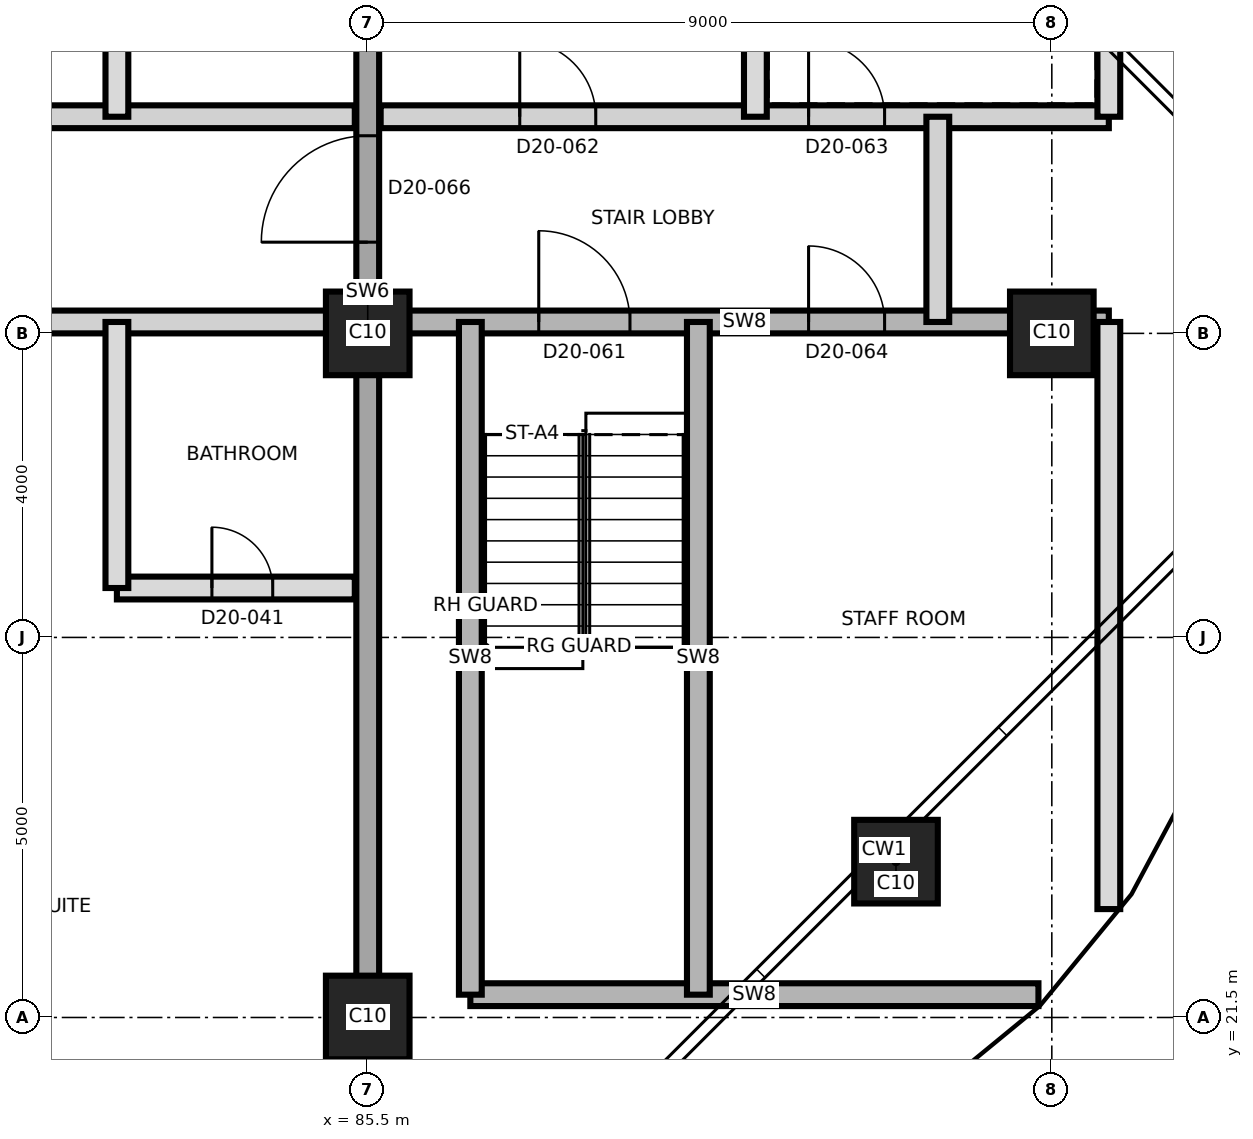
"""IFC4 building model, lengths in metres.
Left out: names, types, materials, properties, quantities, classifications, styles, units other than length and angle.
Written with IfcOpenShell. Run it as: python <this file> out.ifc"""

import sys

from ifc_helpers import new_model, si_unit, direction, frame, frame_2d, origin, origin_2d, place, context, subcontext, project, spatial, rectangle, extrude, element, fill, save


model = new_model("IFC4")
c1 = context("Model", 3, precision=1e-05, world=origin(), true_north=direction((0.0, 1.0)))
c2 = subcontext(c1, "Body", "Model", "MODEL_VIEW")
j1 = project(units=[si_unit("LENGTHUNIT", "METRE"), si_unit("PLANEANGLEUNIT", "RADIAN")], contexts=[c1])
p1 = place(None, origin())
s1 = spatial("IfcSite", under=j1, at=p1, CompositionType="ELEMENT")
p2 = place(p1, origin())
s2 = spatial("IfcBuilding", under=s1, at=p2, CompositionType="ELEMENT")
p3 = place(p2, frame((0.0, 0.0, 182.9)))
s3 = spatial("IfcBuildingStorey", under=s2, at=p3, CompositionType="ELEMENT", Elevation=182.9)
for number, where, z_axis, x_axis in (
    (1, (85.5, 21.5, 0.0), (0.0, 0.0, 1.0), (1.0, 0.0, 0.0)),
    (2, (92.45, 23.55, 0.0), (0.0, 0.0, 1.0), (1.0, 0.0, 0.0)),
    (3, (85.5, 30.5, 0.0), (0.0, 0.0, 1.0), (1.0, 0.0, 0.0)),
    (4, (94.5, 30.5, 0.0), (0.0, 0.0, 1.0), (1.0, 0.0, 0.0)),
):
    element("IfcColumn", number, at=place(p3, frame(where, z_axis=z_axis, x_axis=x_axis)), inside=s3, PredefinedType="COLUMN", context=c2, shape_type="SweptSolid", body=[
        extrude(rectangle(XDim=1.1, YDim=1.1, at=origin_2d()), origin(), (0.0, 0.0, 1.0), 3.7),
    ])
p4 = place(p3, frame((85.5, 19.17, 0.0), z_axis=(0.0, 0.0, 1.0), x_axis=(0.0, 1.0, 0.0)))
e5 = element("IfcWall", 5, at=p4, inside=s3, PredefinedType="SHEAR", context=c2, shape_type="SweptSolid", body=[
    extrude(rectangle(XDim=22.66, YDim=0.3, at=frame_2d((11.33, 0.0))), origin(), (0.0, 0.0, 1.0), 3.7),
])
p5 = place(p4, frame((12.53, 0.0, 0.0)))
e6 = element("IfcOpeningElement", 6, at=p5, cuts=e5, PredefinedType="OPENING", context=c2, shape_type="SweptSolid", body=[
    extrude(rectangle(XDim=1.4, YDim=2.1, at=frame_2d((0.7, 1.05))), frame((0.0, 0.16, 0.0), z_axis=(0.0, -1.0, 0.0), x_axis=(1.0, 0.0, 0.0)), (0.0, 0.0, 1.0), 0.32),
])
p6 = place(p3, frame((86.85, 21.8, 0.0), z_axis=(0.0, 0.0, 1.0), x_axis=(1.0, 0.0, 0.0)))
e7 = element("IfcWall", 7, at=p6, inside=s3, PredefinedType="SHEAR", context=c2, shape_type="SweptSolid", body=[
    extrude(rectangle(XDim=7.474, YDim=0.3, at=frame_2d((3.737, 0.0))), origin(), (0.0, 0.0, 1.0), 3.4),
])
p7 = place(p3, frame((82.2, 27.15, 0.0), z_axis=(0.0, 0.0, 1.0), x_axis=(1.0, 0.0, 0.0)))
e8 = element("IfcWall", 8, at=p7, inside=s3, PredefinedType="PARTITIONING", context=c2, shape_type="SweptSolid", body=[
    extrude(rectangle(XDim=3.13, YDim=0.3, at=frame_2d((1.565, 0.0))), origin(), (0.0, 0.0, 1.0), 3.4),
])
p8 = place(p7, frame((1.25, 0.0, 0.0)))
e9 = element("IfcOpeningElement", 9, at=p8, cuts=e8, PredefinedType="OPENING", context=c2, shape_type="SweptSolid", body=[
    extrude(rectangle(XDim=0.8, YDim=2.1, at=frame_2d((0.4, 1.05))), frame((0.0, 0.16, 0.0), z_axis=(0.0, -1.0, 0.0), x_axis=(1.0, 0.0, 0.0)), (0.0, 0.0, 1.0), 0.32),
])
p9 = place(p3, frame((58.65, 30.65, 0.0), z_axis=(0.0, 0.0, 1.0), x_axis=(1.0, 0.0, 0.0)))
e10 = element("IfcWall", 10, at=p9, inside=s3, PredefinedType="PARTITIONING", context=c2, shape_type="SweptSolid", body=[
    extrude(rectangle(XDim=26.68, YDim=0.3, at=frame_2d((13.34, 0.0))), origin(), (0.0, 0.0, 1.0), 3.4),
])
p10 = place(p9, frame((2.9, 0.0, 0.0)))
e11 = element("IfcOpeningElement", 11, at=p10, cuts=e10, PredefinedType="OPENING", context=c2, shape_type="SweptSolid", body=[
    extrude(rectangle(XDim=1.0, YDim=2.1, at=frame_2d((0.5, 1.05))), frame((0.0, 0.16, 0.0), z_axis=(0.0, -1.0, 0.0), x_axis=(1.0, 0.0, 0.0)), (0.0, 0.0, 1.0), 0.32),
])
p11 = place(p9, frame((5.85, 0.0, 0.0)))
e12 = element("IfcOpeningElement", 12, at=p11, cuts=e10, PredefinedType="OPENING", context=c2, shape_type="SweptSolid", body=[
    extrude(rectangle(XDim=1.4, YDim=2.1, at=frame_2d((0.7, 1.05))), frame((0.0, 0.16, 0.0), z_axis=(0.0, -1.0, 0.0), x_axis=(1.0, 0.0, 0.0)), (0.0, 0.0, 1.0), 0.32),
])
p12 = place(p9, frame((10.0, 0.0, 0.0)))
e13 = element("IfcOpeningElement", 13, at=p12, cuts=e10, PredefinedType="OPENING", context=c2, shape_type="SweptSolid", body=[
    extrude(rectangle(XDim=1.0, YDim=2.1, at=frame_2d((0.5, 1.05))), frame((0.0, 0.16, 0.0), z_axis=(0.0, -1.0, 0.0), x_axis=(1.0, 0.0, 0.0)), (0.0, 0.0, 1.0), 0.32),
])
p13 = place(p9, frame((15.85, 0.0, 0.0)))
e14 = element("IfcOpeningElement", 14, at=p13, cuts=e10, PredefinedType="OPENING", context=c2, shape_type="SweptSolid", body=[
    extrude(rectangle(XDim=1.0, YDim=2.1, at=frame_2d((0.5, 1.05))), frame((0.0, 0.16, 0.0), z_axis=(0.0, -1.0, 0.0), x_axis=(1.0, 0.0, 0.0)), (0.0, 0.0, 1.0), 0.32),
])
p14 = place(p9, frame((20.2, 0.0, 0.0)))
e15 = element("IfcOpeningElement", 15, at=p14, cuts=e10, PredefinedType="OPENING", context=c2, shape_type="SweptSolid", body=[
    extrude(rectangle(XDim=1.0, YDim=2.1, at=frame_2d((0.5, 1.05))), frame((0.0, 0.16, 0.0), z_axis=(0.0, -1.0, 0.0), x_axis=(1.0, 0.0, 0.0)), (0.0, 0.0, 1.0), 0.32),
])
p15 = place(p3, frame((85.67, 30.65, 0.0), z_axis=(0.0, 0.0, 1.0), x_axis=(1.0, 0.0, 0.0)))
e16 = element("IfcWall", 16, at=p15, inside=s3, PredefinedType="SHEAR", context=c2, shape_type="SweptSolid", body=[
    extrude(rectangle(XDim=9.58, YDim=0.3, at=frame_2d((4.79, 0.0))), origin(), (0.0, 0.0, 1.0), 3.4),
])
p16 = place(p15, frame((2.08, 0.0, 0.0)))
e17 = element("IfcOpeningElement", 17, at=p16, cuts=e16, PredefinedType="OPENING", context=c2, shape_type="SweptSolid", body=[
    extrude(rectangle(XDim=1.2, YDim=2.1, at=frame_2d((0.6, 1.05))), frame((0.0, 0.16, 0.0), z_axis=(0.0, -1.0, 0.0), x_axis=(1.0, 0.0, 0.0)), (0.0, 0.0, 1.0), 0.32),
])
p17 = place(p15, frame((5.63, 0.0, 0.0)))
e18 = element("IfcOpeningElement", 18, at=p17, cuts=e16, PredefinedType="OPENING", context=c2, shape_type="SweptSolid", body=[
    extrude(rectangle(XDim=1.0, YDim=2.1, at=frame_2d((0.5, 1.05))), frame((0.0, 0.16, 0.0), z_axis=(0.0, -1.0, 0.0), x_axis=(1.0, 0.0, 0.0)), (0.0, 0.0, 1.0), 0.32),
])
p18 = place(p3, frame((58.65, 33.35, 0.0), z_axis=(0.0, 0.0, 1.0), x_axis=(1.0, 0.0, 0.0)))
e19 = element("IfcWall", 19, at=p18, inside=s3, PredefinedType="PARTITIONING", context=c2, shape_type="SweptSolid", body=[
    extrude(rectangle(XDim=26.68, YDim=0.3, at=frame_2d((13.34, 0.0))), origin(), (0.0, 0.0, 1.0), 3.4),
])
p19 = place(p18, frame((3.265, 0.0, 0.0)))
e20 = element("IfcOpeningElement", 20, at=p19, cuts=e19, PredefinedType="OPENING", context=c2, shape_type="SweptSolid", body=[
    extrude(rectangle(XDim=1.0, YDim=2.1, at=frame_2d((0.5, 1.05))), frame((0.0, 0.16, 0.0), z_axis=(0.0, -1.0, 0.0), x_axis=(1.0, 0.0, 0.0)), (0.0, 0.0, 1.0), 0.32),
])
p20 = place(p18, frame((6.215, 0.0, 0.0)))
e21 = element("IfcOpeningElement", 21, at=p20, cuts=e19, PredefinedType="OPENING", context=c2, shape_type="SweptSolid", body=[
    extrude(rectangle(XDim=1.4, YDim=2.1, at=frame_2d((0.7, 1.05))), frame((0.0, 0.16, 0.0), z_axis=(0.0, -1.0, 0.0), x_axis=(1.0, 0.0, 0.0)), (0.0, 0.0, 1.0), 0.32),
])
p21 = place(p18, frame((9.985, 0.0, 0.0)))
e22 = element("IfcOpeningElement", 22, at=p21, cuts=e19, PredefinedType="OPENING", context=c2, shape_type="SweptSolid", body=[
    extrude(rectangle(XDim=1.2, YDim=2.1, at=frame_2d((0.6, 1.05))), frame((0.0, 0.16, 0.0), z_axis=(0.0, -1.0, 0.0), x_axis=(1.0, 0.0, 0.0)), (0.0, 0.0, 1.0), 0.32),
])
p22 = place(p18, frame((13.235, 0.0, 0.0)))
e23 = element("IfcOpeningElement", 23, at=p22, cuts=e19, PredefinedType="OPENING", context=c2, shape_type="SweptSolid", body=[
    extrude(rectangle(XDim=1.0, YDim=2.1, at=frame_2d((0.5, 1.05))), frame((0.0, 0.16, 0.0), z_axis=(0.0, -1.0, 0.0), x_axis=(1.0, 0.0, 0.0)), (0.0, 0.0, 1.0), 0.32),
])
p23 = place(p18, frame((20.2, 0.0, 0.0)))
e24 = element("IfcOpeningElement", 24, at=p23, cuts=e19, PredefinedType="OPENING", context=c2, shape_type="SweptSolid", body=[
    extrude(rectangle(XDim=1.0, YDim=2.1, at=frame_2d((0.5, 1.05))), frame((0.0, 0.16, 0.0), z_axis=(0.0, -1.0, 0.0), x_axis=(1.0, 0.0, 0.0)), (0.0, 0.0, 1.0), 0.32),
])
p24 = place(p3, frame((85.67, 33.35, 0.0), z_axis=(0.0, 0.0, 1.0), x_axis=(1.0, 0.0, 0.0)))
e25 = element("IfcWall", 25, at=p24, inside=s3, PredefinedType="PARTITIONING", context=c2, shape_type="SweptSolid", body=[
    extrude(rectangle(XDim=9.58, YDim=0.3, at=frame_2d((4.79, 0.0))), origin(), (0.0, 0.0, 1.0), 3.4),
])
p25 = place(p24, frame((1.83, 0.0, 0.0)))
e26 = element("IfcOpeningElement", 26, at=p25, cuts=e25, PredefinedType="OPENING", context=c2, shape_type="SweptSolid", body=[
    extrude(rectangle(XDim=1.0, YDim=2.1, at=frame_2d((0.5, 1.05))), frame((0.0, 0.16, 0.0), z_axis=(0.0, -1.0, 0.0), x_axis=(1.0, 0.0, 0.0)), (0.0, 0.0, 1.0), 0.32),
])
p26 = place(p24, frame((5.63, 0.0, 0.0)))
e27 = element("IfcOpeningElement", 27, at=p26, cuts=e25, PredefinedType="OPENING", context=c2, shape_type="SweptSolid", body=[
    extrude(rectangle(XDim=1.0, YDim=2.1, at=frame_2d((0.5, 1.05))), frame((0.0, 0.16, 0.0), z_axis=(0.0, -1.0, 0.0), x_axis=(1.0, 0.0, 0.0)), (0.0, 0.0, 1.0), 0.32),
])
for number, where, z_axis, x_axis in (
    (28, (82.2, 27.15, 0.0), (0.0, 0.0, 1.0), (0.0, 1.0, 0.0)),
    (29, (82.2, 33.35, 0.0), (0.0, 0.0, 1.0), (0.0, 1.0, 0.0)),
):
    element("IfcWall", number, at=place(p3, frame(where, z_axis=z_axis, x_axis=x_axis)), inside=s3, PredefinedType="PARTITIONING", context=c2, shape_type="SweptSolid", body=[
        extrude(rectangle(XDim=3.5, YDim=0.3, at=frame_2d((1.75, 0.0))), origin(), (0.0, 0.0, 1.0), 3.4),
    ])
for number, where, z_axis, x_axis in (
    (30, (86.85, 21.8, 0.0), (0.0, 0.0, 1.0), (0.0, 1.0, 0.0)),
    (31, (89.85, 21.8, 0.0), (0.0, 0.0, 1.0), (0.0, 1.0, 0.0)),
):
    element("IfcWall", number, at=place(p3, frame(where, z_axis=z_axis, x_axis=x_axis)), inside=s3, PredefinedType="SHEAR", context=c2, shape_type="SweptSolid", body=[
        extrude(rectangle(XDim=8.85, YDim=0.3, at=frame_2d((4.425, 0.0))), origin(), (0.0, 0.0, 1.0), 3.4),
    ])
p27 = place(p3, frame((90.6, 33.35, 0.0), z_axis=(0.0, 0.0, 1.0), x_axis=(0.0, 1.0, 0.0)))
e32 = element("IfcWall", 32, at=p27, inside=s3, PredefinedType="PARTITIONING", context=c2, shape_type="SweptSolid", body=[
    extrude(rectangle(XDim=7.5, YDim=0.3, at=frame_2d((3.75, 0.0))), origin(), (0.0, 0.0, 1.0), 3.4),
])
p28 = place(p3, frame((93.0, 30.65, 0.0), z_axis=(0.0, 0.0, 1.0), x_axis=(0.0, 1.0, 0.0)))
e33 = element("IfcWall", 33, at=p28, inside=s3, PredefinedType="PARTITIONING", context=c2, shape_type="SweptSolid", body=[
    extrude(rectangle(XDim=2.7, YDim=0.3, at=frame_2d((1.35, 0.0))), origin(), (0.0, 0.0, 1.0), 3.4),
])
p29 = place(p3, frame((95.25, 22.926, 0.0), z_axis=(0.0, 0.0, 1.0), x_axis=(0.0, 1.0, 0.0)))
e34 = element("IfcWall", 34, at=p29, inside=s3, PredefinedType="PARTITIONING", context=c2, shape_type="SweptSolid", body=[
    extrude(rectangle(XDim=7.724, YDim=0.3, at=frame_2d((3.862, 0.0))), origin(), (0.0, 0.0, 1.0), 3.4),
])
p30 = place(p3, frame((95.25, 33.35, 0.0), z_axis=(0.0, 0.0, 1.0), x_axis=(0.0, 1.0, 0.0)))
e35 = element("IfcWall", 35, at=p30, inside=s3, PredefinedType="PARTITIONING", context=c2, shape_type="SweptSolid", body=[
    extrude(rectangle(XDim=4.724, YDim=0.3, at=frame_2d((2.362, 0.0))), origin(), (0.0, 0.0, 1.0), 3.4),
])
p31 = place(p8, origin())
e36 = element("IfcDoor", 36, at=p31, inside=s3, OperationType="SINGLE_SWING_LEFT", PredefinedType="DOOR", context=c2, shape_type="SweptSolid", body=[
    extrude(rectangle(XDim=0.8, YDim=2.1, at=frame_2d((0.4, 1.05))), frame((0.0, 0.025, 0.0), z_axis=(0.0, -1.0, 0.0), x_axis=(1.0, 0.0, 0.0)), (0.0, 0.0, 1.0), 0.05),
])
fill(e9, e36)
p32 = place(p16, origin())
e37 = element("IfcDoor", 37, at=p32, inside=s3, OperationType="SINGLE_SWING_LEFT", PredefinedType="DOOR", context=c2, shape_type="SweptSolid", body=[
    extrude(rectangle(XDim=1.2, YDim=2.1, at=frame_2d((0.6, 1.05))), frame((0.0, 0.025, 0.0), z_axis=(0.0, -1.0, 0.0), x_axis=(1.0, 0.0, 0.0)), (0.0, 0.0, 1.0), 0.05),
])
fill(e17, e37)
p33 = place(p25, origin())
e38 = element("IfcDoor", 38, at=p33, inside=s3, OperationType="SINGLE_SWING_LEFT", PredefinedType="DOOR", context=c2, shape_type="SweptSolid", body=[
    extrude(rectangle(XDim=1.0, YDim=2.1, at=frame_2d((0.5, 1.05))), frame((0.0, 0.025, 0.0), z_axis=(0.0, -1.0, 0.0), x_axis=(1.0, 0.0, 0.0)), (0.0, 0.0, 1.0), 0.05),
])
fill(e26, e38)
p34 = place(p26, origin())
e39 = element("IfcDoor", 39, at=p34, inside=s3, OperationType="SINGLE_SWING_RIGHT", PredefinedType="DOOR", context=c2, shape_type="SweptSolid", body=[
    extrude(rectangle(XDim=1.0, YDim=2.1, at=frame_2d((0.5, 1.05))), frame((0.0, 0.025, 0.0), z_axis=(0.0, -1.0, 0.0), x_axis=(1.0, 0.0, 0.0)), (0.0, 0.0, 1.0), 0.05),
])
fill(e27, e39)
p35 = place(p17, origin())
e40 = element("IfcDoor", 40, at=p35, inside=s3, OperationType="SINGLE_SWING_LEFT", PredefinedType="DOOR", context=c2, shape_type="SweptSolid", body=[
    extrude(rectangle(XDim=1.0, YDim=2.1, at=frame_2d((0.5, 1.05))), frame((0.0, 0.025, 0.0), z_axis=(0.0, -1.0, 0.0), x_axis=(1.0, 0.0, 0.0)), (0.0, 0.0, 1.0), 0.05),
])
fill(e18, e40)
p36 = place(p5, origin())
e41 = element("IfcDoor", 41, at=p36, inside=s3, OperationType="SINGLE_SWING_RIGHT", PredefinedType="DOOR", context=c2, shape_type="SweptSolid", body=[
    extrude(rectangle(XDim=1.4, YDim=2.1, at=frame_2d((0.7, 1.05))), frame((0.0, 0.025, 0.0), z_axis=(0.0, -1.0, 0.0), x_axis=(1.0, 0.0, 0.0)), (0.0, 0.0, 1.0), 0.05),
])
fill(e6, e41)
save(model, sys.argv[1])
